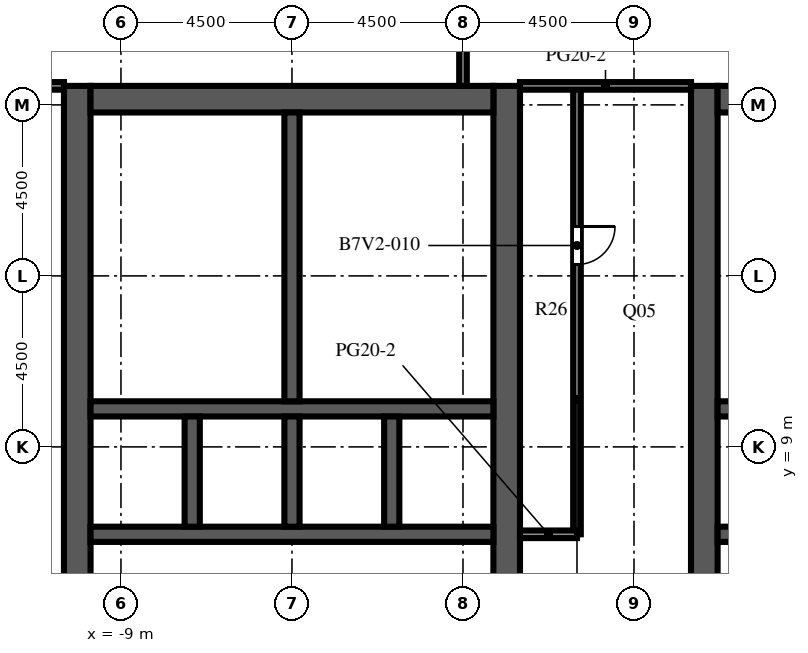
"""IFC4 building model, lengths in metres.
Left out: names, types, materials, properties, quantities, classifications, styles, units other than length and angle.
Written with IfcOpenShell. Run it as: python <this file> out.ifc"""

import sys

from ifc_helpers import new_model, si_unit, direction, frame, frame_2d, origin, place, context, subcontext, project, spatial, rectangle, extrude, element, fill, save


model = new_model("IFC4")
c1 = context("Model", 3, precision=1e-05, world=origin(), true_north=direction((0.0, 1.0)))
c2 = subcontext(c1, "Body", "Model", "MODEL_VIEW")
j1 = project(units=[si_unit("LENGTHUNIT", "METRE"), si_unit("PLANEANGLEUNIT", "RADIAN")], contexts=[c1])
p1 = place(None, origin())
s1 = spatial("IfcSite", under=j1, at=p1, CompositionType="ELEMENT")
p2 = place(p1, origin())
s2 = spatial("IfcBuilding", under=s1, at=p2, CompositionType="ELEMENT")
p3 = place(p2, frame((0.0, 0.0, 256.2)))
s3 = spatial("IfcBuildingStorey", under=s2, at=p3, CompositionType="ELEMENT", Elevation=256.2)
p4 = place(p3, frame((-10.15, -9.0, 0.0), z_axis=(0.0, 0.0, 1.0), x_axis=(0.0, 1.0, 0.0)))
e1 = element("IfcWall", 1, at=p4, inside=s3, PredefinedType="SHEAR", context=c2, shape_type="SweptSolid", body=[
    extrude(rectangle(XDim=27.5, YDim=0.7, at=frame_2d((13.75, 0.0))), origin(), (0.0, 0.0, 1.0), 4.1),
])
p5 = place(p4, frame((12.55, 0.0, 0.0)))
e2 = element("IfcOpeningElement", 2, at=p5, cuts=e1, PredefinedType="OPENING", context=c2, shape_type="SweptSolid", body=[
    extrude(rectangle(XDim=2.4, YDim=2.4, at=frame_2d((1.2, 1.2))), frame((0.0, 0.36, 0.0), z_axis=(0.0, -1.0, 0.0), x_axis=(1.0, 0.0, 0.0)), (0.0, 0.0, 1.0), 0.72),
])
p6 = place(p4, frame((6.825, 0.0, 0.0)))
e3 = element("IfcOpeningElement", 3, at=p6, cuts=e1, PredefinedType="OPENING", context=c2, shape_type="SweptSolid", body=[
    extrude(rectangle(XDim=1.2, YDim=2.1, at=frame_2d((0.6, 1.05))), frame((0.0, 0.36, 0.0), z_axis=(0.0, -1.0, 0.0), x_axis=(1.0, 0.0, 0.0)), (0.0, 0.0, 1.0), 0.72),
])
p7 = place(p4, frame((19.475, 0.0, 0.0)))
e4 = element("IfcOpeningElement", 4, at=p7, cuts=e1, PredefinedType="OPENING", context=c2, shape_type="SweptSolid", body=[
    extrude(rectangle(XDim=1.2, YDim=2.1, at=frame_2d((0.6, 1.05))), frame((0.0, 0.36, 0.0), z_axis=(0.0, -1.0, 0.0), x_axis=(1.0, 0.0, 0.0)), (0.0, 0.0, 1.0), 0.72),
])
p8 = place(p3, frame((1.15, -9.0, 0.0), z_axis=(0.0, 0.0, 1.0), x_axis=(0.0, 1.0, 0.0)))
e5 = element("IfcWall", 5, at=p8, inside=s3, PredefinedType="SHEAR", context=c2, shape_type="SweptSolid", body=[
    extrude(rectangle(XDim=27.5, YDim=0.7, at=frame_2d((13.75, 0.0))), origin(), (0.0, 0.0, 1.0), 4.1),
])
p9 = place(p8, frame((12.55, 0.0, 0.0)))
e6 = element("IfcOpeningElement", 6, at=p9, cuts=e5, PredefinedType="OPENING", context=c2, shape_type="SweptSolid", body=[
    extrude(rectangle(XDim=2.4, YDim=2.4, at=frame_2d((1.2, 1.2))), frame((0.0, 0.36, 0.0), z_axis=(0.0, -1.0, 0.0), x_axis=(1.0, 0.0, 0.0)), (0.0, 0.0, 1.0), 0.72),
])
p10 = place(p8, frame((3.788, 0.0, 0.0)))
e7 = element("IfcOpeningElement", 7, at=p10, cuts=e5, PredefinedType="OPENING", context=c2, shape_type="SweptSolid", body=[
    extrude(rectangle(XDim=0.968, YDim=2.1, at=frame_2d((0.484, 1.05))), frame((0.0, 0.36, 0.0), z_axis=(0.0, -1.0, 0.0), x_axis=(1.0, 0.0, 0.0)), (0.0, 0.0, 1.0), 0.72),
])
p11 = place(p8, frame((23.54, 0.0, 0.0)))
e8 = element("IfcOpeningElement", 8, at=p11, cuts=e5, PredefinedType="OPENING", context=c2, shape_type="SweptSolid", body=[
    extrude(rectangle(XDim=1.2, YDim=2.1, at=frame_2d((0.6, 1.05))), frame((0.0, 0.36, 0.0), z_axis=(0.0, -1.0, 0.0), x_axis=(1.0, 0.0, 0.0)), (0.0, 0.0, 1.0), 0.72),
])
p12 = place(p3, frame((-9.8, 18.15, 0.0), z_axis=(0.0, 0.0, 1.0), x_axis=(1.0, 0.0, 0.0)))
e9 = element("IfcWall", 9, at=p12, inside=s3, PredefinedType="SHEAR", context=c2, shape_type="SweptSolid", body=[
    extrude(rectangle(XDim=10.6, YDim=0.7, at=frame_2d((5.3, 0.0))), origin(), (0.0, 0.0, 1.0), 4.1),
])
p13 = place(p3, frame((-9.8, 6.7, 0.0), z_axis=(0.0, 0.0, 1.0), x_axis=(1.0, 0.0, 0.0)))
e10 = element("IfcWall", 10, at=p13, inside=s3, PredefinedType="SHEAR", context=c2, shape_type="SweptSolid", body=[
    extrude(rectangle(XDim=10.6, YDim=0.4, at=frame_2d((5.3, 0.0))), origin(), (0.0, 0.0, 1.0), 4.1),
])
p14 = place(p13, frame((3.438, 0.0, 0.0)))
e11 = element("IfcOpeningElement", 11, at=p14, cuts=e10, PredefinedType="OPENING", context=c2, shape_type="SweptSolid", body=[
    extrude(rectangle(XDim=1.1, YDim=2.1, at=frame_2d((0.55, 1.05))), frame((0.0, 0.21, 0.0), z_axis=(0.0, -1.0, 0.0), x_axis=(1.0, 0.0, 0.0)), (0.0, 0.0, 1.0), 0.42),
])
p15 = place(p13, frame((6.062, 0.0, 0.0)))
e12 = element("IfcOpeningElement", 12, at=p15, cuts=e10, PredefinedType="OPENING", context=c2, shape_type="SweptSolid", body=[
    extrude(rectangle(XDim=1.1, YDim=2.1, at=frame_2d((0.55, 1.05))), frame((0.0, 0.21, 0.0), z_axis=(0.0, -1.0, 0.0), x_axis=(1.0, 0.0, 0.0)), (0.0, 0.0, 1.0), 0.42),
])
p16 = place(p13, frame((8.812, 0.0, 0.0)))
e13 = element("IfcOpeningElement", 13, at=p16, cuts=e10, PredefinedType="OPENING", context=c2, shape_type="SweptSolid", body=[
    extrude(rectangle(XDim=1.1, YDim=2.1, at=frame_2d((0.55, 1.05))), frame((0.0, 0.21, 0.0), z_axis=(0.0, -1.0, 0.0), x_axis=(1.0, 0.0, 0.0)), (0.0, 0.0, 1.0), 0.42),
])
p17 = place(p13, frame((0.738, 0.0, 0.0)))
e14 = element("IfcOpeningElement", 14, at=p17, cuts=e10, PredefinedType="OPENING", context=c2, shape_type="SweptSolid", body=[
    extrude(rectangle(XDim=1.0, YDim=2.1, at=frame_2d((0.5, 1.05))), frame((0.0, 0.21, 0.0), z_axis=(0.0, -1.0, 0.0), x_axis=(1.0, 0.0, 0.0)), (0.0, 0.0, 1.0), 0.42),
])
p18 = place(p3, frame((-9.8, 10.0, 0.0), z_axis=(0.0, 0.0, 1.0), x_axis=(1.0, 0.0, 0.0)))
e15 = element("IfcWall", 15, at=p18, inside=s3, PredefinedType="SHEAR", context=c2, shape_type="SweptSolid", body=[
    extrude(rectangle(XDim=10.6, YDim=0.4, at=frame_2d((5.3, 0.0))), origin(), (0.0, 0.0, 1.0), 4.1),
])
for number, where, z_axis, x_axis in (
    (16, (-7.125, 6.9, 0.0), (0.0, 0.0, 1.0), (0.0, 1.0, 0.0)),
    (17, (-4.5, 6.9, 0.0), (0.0, 0.0, 1.0), (0.0, 1.0, 0.0)),
    (18, (-1.875, 6.9, 0.0), (0.0, 0.0, 1.0), (0.0, 1.0, 0.0)),
):
    element("IfcWall", number, at=place(p3, frame(where, z_axis=z_axis, x_axis=x_axis)), inside=s3, PredefinedType="SHEAR", context=c2, shape_type="SweptSolid", body=[
        extrude(rectangle(XDim=2.9, YDim=0.4, at=frame_2d((1.45, 0.0))), origin(), (0.0, 0.0, 1.0), 4.1),
    ])
p19 = place(p3, frame((-4.5, 10.2, 0.0), z_axis=(0.0, 0.0, 1.0), x_axis=(0.0, 1.0, 0.0)))
e19 = element("IfcWall", 19, at=p19, inside=s3, PredefinedType="SHEAR", context=c2, shape_type="SweptSolid", body=[
    extrude(rectangle(XDim=7.6, YDim=0.4, at=frame_2d((3.8, 0.0))), origin(), (0.0, 0.0, 1.0), 4.1),
])
p20 = place(p3, frame((6.35, -9.0, 0.0), z_axis=(0.0, 0.0, 1.0), x_axis=(0.0, 1.0, 0.0)))
e20 = element("IfcWall", 20, at=p20, inside=s3, PredefinedType="SHEAR", context=c2, shape_type="SweptSolid", body=[
    extrude(rectangle(XDim=27.5, YDim=0.7, at=frame_2d((13.75, 0.0))), origin(), (0.0, 0.0, 1.0), 4.1),
])
p21 = place(p20, frame((12.55, 0.0, 0.0)))
e21 = element("IfcOpeningElement", 21, at=p21, cuts=e20, PredefinedType="OPENING", context=c2, shape_type="SweptSolid", body=[
    extrude(rectangle(XDim=2.4, YDim=2.4, at=frame_2d((1.2, 1.2))), frame((0.0, 0.36, 0.0), z_axis=(0.0, -1.0, 0.0), x_axis=(1.0, 0.0, 0.0)), (0.0, 0.0, 1.0), 0.72),
])
p22 = place(p20, frame((3.788, 0.0, 0.0)))
e22 = element("IfcOpeningElement", 22, at=p22, cuts=e20, PredefinedType="OPENING", context=c2, shape_type="SweptSolid", body=[
    extrude(rectangle(XDim=0.968, YDim=2.1, at=frame_2d((0.484, 1.05))), frame((0.0, 0.36, 0.0), z_axis=(0.0, -1.0, 0.0), x_axis=(1.0, 0.0, 0.0)), (0.0, 0.0, 1.0), 0.72),
])
p23 = place(p20, frame((23.54, 0.0, 0.0)))
e23 = element("IfcOpeningElement", 23, at=p23, cuts=e20, PredefinedType="OPENING", context=c2, shape_type="SweptSolid", body=[
    extrude(rectangle(XDim=1.2, YDim=2.1, at=frame_2d((0.6, 1.05))), frame((0.0, 0.36, 0.0), z_axis=(0.0, -1.0, 0.0), x_axis=(1.0, 0.0, 0.0)), (0.0, 0.0, 1.0), 0.72),
])
p24 = place(p3, frame((6.7, 18.15, 0.0), z_axis=(0.0, 0.0, 1.0), x_axis=(1.0, 0.0, 0.0)))
e24 = element("IfcWall", 24, at=p24, inside=s3, PredefinedType="SHEAR", context=c2, shape_type="SweptSolid", body=[
    extrude(rectangle(XDim=10.6, YDim=0.7, at=frame_2d((5.3, 0.0))), origin(), (0.0, 0.0, 1.0), 4.1),
])
p25 = place(p3, frame((6.7, 6.7, 0.0), z_axis=(0.0, 0.0, 1.0), x_axis=(1.0, 0.0, 0.0)))
e25 = element("IfcWall", 25, at=p25, inside=s3, PredefinedType="SHEAR", context=c2, shape_type="SweptSolid", body=[
    extrude(rectangle(XDim=10.6, YDim=0.4, at=frame_2d((5.3, 0.0))), origin(), (0.0, 0.0, 1.0), 4.1),
])
p26 = place(p25, frame((3.438, 0.0, 0.0)))
e26 = element("IfcOpeningElement", 26, at=p26, cuts=e25, PredefinedType="OPENING", context=c2, shape_type="SweptSolid", body=[
    extrude(rectangle(XDim=1.1, YDim=2.1, at=frame_2d((0.55, 1.05))), frame((0.0, 0.21, 0.0), z_axis=(0.0, -1.0, 0.0), x_axis=(1.0, 0.0, 0.0)), (0.0, 0.0, 1.0), 0.42),
])
p27 = place(p25, frame((6.062, 0.0, 0.0)))
e27 = element("IfcOpeningElement", 27, at=p27, cuts=e25, PredefinedType="OPENING", context=c2, shape_type="SweptSolid", body=[
    extrude(rectangle(XDim=1.1, YDim=2.1, at=frame_2d((0.55, 1.05))), frame((0.0, 0.21, 0.0), z_axis=(0.0, -1.0, 0.0), x_axis=(1.0, 0.0, 0.0)), (0.0, 0.0, 1.0), 0.42),
])
p28 = place(p25, frame((8.812, 0.0, 0.0)))
e28 = element("IfcOpeningElement", 28, at=p28, cuts=e25, PredefinedType="OPENING", context=c2, shape_type="SweptSolid", body=[
    extrude(rectangle(XDim=1.1, YDim=2.1, at=frame_2d((0.55, 1.05))), frame((0.0, 0.21, 0.0), z_axis=(0.0, -1.0, 0.0), x_axis=(1.0, 0.0, 0.0)), (0.0, 0.0, 1.0), 0.42),
])
p29 = place(p25, frame((0.738, 0.0, 0.0)))
e29 = element("IfcOpeningElement", 29, at=p29, cuts=e25, PredefinedType="OPENING", context=c2, shape_type="SweptSolid", body=[
    extrude(rectangle(XDim=1.0, YDim=2.1, at=frame_2d((0.5, 1.05))), frame((0.0, 0.21, 0.0), z_axis=(0.0, -1.0, 0.0), x_axis=(1.0, 0.0, 0.0)), (0.0, 0.0, 1.0), 0.42),
])
p30 = place(p3, frame((6.7, 10.0, 0.0), z_axis=(0.0, 0.0, 1.0), x_axis=(1.0, 0.0, 0.0)))
e30 = element("IfcWall", 30, at=p30, inside=s3, PredefinedType="SHEAR", context=c2, shape_type="SweptSolid", body=[
    extrude(rectangle(XDim=10.6, YDim=0.4, at=frame_2d((5.3, 0.0))), origin(), (0.0, 0.0, 1.0), 4.1),
])
p31 = place(p3, frame((-0.5, 12.48, 0.0), z_axis=(0.0, 0.0, 1.0), x_axis=(1.0, 0.0, 0.0)))
e31 = element("IfcWall", 31, at=p31, inside=s3, PredefinedType="PARTITIONING", context=c2, shape_type="SweptSolid", body=[
    extrude(rectangle(XDim=1.3, YDim=0.1, at=frame_2d((0.65, 0.0))), origin(), (0.0, 0.0, 1.0), 3.5),
])
p32 = place(p31, frame((0.2, 0.0, 0.0)))
e32 = element("IfcOpeningElement", 32, at=p32, cuts=e31, PredefinedType="OPENING", context=c2, shape_type="SweptSolid", body=[
    extrude(rectangle(XDim=0.9, YDim=2.1, at=frame_2d((0.45, 1.05))), frame((0.0, 0.06, 0.0), z_axis=(0.0, -1.0, 0.0), x_axis=(1.0, 0.0, 0.0)), (0.0, 0.0, 1.0), 0.12),
])
p33 = place(p3, frame((-4.3, 12.48, 0.0), z_axis=(0.0, 0.0, 1.0), x_axis=(1.0, 0.0, 0.0)))
e33 = element("IfcWall", 33, at=p33, inside=s3, PredefinedType="PARTITIONING", context=c2, shape_type="SweptSolid", body=[
    extrude(rectangle(XDim=3.8, YDim=0.1, at=frame_2d((1.9, 0.0))), origin(), (0.0, 0.0, 1.0), 3.5),
])
p34 = place(p3, frame((-0.5, 12.48, 0.0), z_axis=(0.0, 0.0, 1.0), x_axis=(0.0, 1.0, 0.0)))
e34 = element("IfcWall", 34, at=p34, inside=s3, PredefinedType="PARTITIONING", context=c2, shape_type="SweptSolid", body=[
    extrude(rectangle(XDim=2.66, YDim=0.1, at=frame_2d((1.33, 0.0))), origin(), (0.0, 0.0, 1.0), 3.5),
])
p35 = place(p34, frame((0.83, 0.0, 0.0)))
e35 = element("IfcOpeningElement", 35, at=p35, cuts=e34, PredefinedType="OPENING", context=c2, shape_type="SweptSolid", body=[
    extrude(rectangle(XDim=1.0, YDim=2.1, at=frame_2d((0.5, 1.05))), frame((0.0, 0.06, 0.0), z_axis=(0.0, -1.0, 0.0), x_axis=(1.0, 0.0, 0.0)), (0.0, 0.0, 1.0), 0.12),
])
p36 = place(p3, frame((-0.5, 15.14, 0.0), z_axis=(0.0, 0.0, 1.0), x_axis=(0.0, 1.0, 0.0)))
e36 = element("IfcWall", 36, at=p36, inside=s3, PredefinedType="PARTITIONING", context=c2, shape_type="SweptSolid", body=[
    extrude(rectangle(XDim=2.66, YDim=0.1, at=frame_2d((1.33, 0.0))), origin(), (0.0, 0.0, 1.0), 3.5),
])
p37 = place(p36, frame((0.83, 0.0, 0.0)))
e37 = element("IfcOpeningElement", 37, at=p37, cuts=e36, PredefinedType="OPENING", context=c2, shape_type="SweptSolid", body=[
    extrude(rectangle(XDim=1.0, YDim=2.1, at=frame_2d((0.5, 1.05))), frame((0.0, 0.06, 0.0), z_axis=(0.0, -1.0, 0.0), x_axis=(1.0, 0.0, 0.0)), (0.0, 0.0, 1.0), 0.12),
])
p38 = place(p3, frame((-4.3, 15.14, 0.0), z_axis=(0.0, 0.0, 1.0), x_axis=(1.0, 0.0, 0.0)))
e38 = element("IfcWall", 38, at=p38, inside=s3, PredefinedType="PARTITIONING", context=c2, shape_type="SweptSolid", body=[
    extrude(rectangle(XDim=3.8, YDim=0.1, at=frame_2d((1.9, 0.0))), origin(), (0.0, 0.0, 1.0), 3.5),
])
p39 = place(p3, frame((6.7, 12.48, 0.0), z_axis=(0.0, 0.0, 1.0), x_axis=(1.0, 0.0, 0.0)))
e39 = element("IfcWall", 39, at=p39, inside=s3, PredefinedType="PARTITIONING", context=c2, shape_type="SweptSolid", body=[
    extrude(rectangle(XDim=1.3, YDim=0.1, at=frame_2d((0.65, 0.0))), origin(), (0.0, 0.0, 1.0), 3.5),
])
p40 = place(p39, frame((0.2, 0.0, 0.0)))
e40 = element("IfcOpeningElement", 40, at=p40, cuts=e39, PredefinedType="OPENING", context=c2, shape_type="SweptSolid", body=[
    extrude(rectangle(XDim=0.9, YDim=2.1, at=frame_2d((0.45, 1.05))), frame((0.0, 0.06, 0.0), z_axis=(0.0, -1.0, 0.0), x_axis=(1.0, 0.0, 0.0)), (0.0, 0.0, 1.0), 0.12),
])
p41 = place(p3, frame((0.0, 18.5, 0.0), z_axis=(0.0, 0.0, 1.0), x_axis=(0.0, 1.0, 0.0)))
e41 = element("IfcWall", 41, at=p41, inside=s3, PredefinedType="PARTITIONING", context=c2, shape_type="SweptSolid", body=[
    extrude(rectangle(XDim=3.5, YDim=0.2, at=frame_2d((1.75, 0.0))), origin(), (0.0, 0.0, 1.0), 3.5),
])
p42 = place(p3, frame((3.0, 6.7, 0.0), z_axis=(0.0, 0.0, 1.0), x_axis=(0.0, 1.0, 0.0)))
e42 = element("IfcWall", 42, at=p42, inside=s3, PredefinedType="PARTITIONING", context=c2, shape_type="SweptSolid", body=[
    extrude(rectangle(XDim=11.8, YDim=0.2, at=frame_2d((5.9, 0.0))), origin(), (0.0, 0.0, 1.0), 3.5),
])
p43 = place(p42, frame((7.1, 0.0, 0.0)))
e43 = element("IfcOpeningElement", 43, at=p43, cuts=e42, PredefinedType="OPENING", context=c2, shape_type="SweptSolid", body=[
    extrude(rectangle(XDim=1.0, YDim=2.1, at=frame_2d((0.5, 1.05))), frame((0.0, 0.11, 0.0), z_axis=(0.0, -1.0, 0.0), x_axis=(1.0, 0.0, 0.0)), (0.0, 0.0, 1.0), 0.22),
])
p44 = place(p3, frame((1.5, 6.7, 0.0), z_axis=(0.0, 0.0, 1.0), x_axis=(1.0, 0.0, 0.0)))
e44 = element("IfcWall", 44, at=p44, inside=s3, PredefinedType="PARTITIONING", context=c2, shape_type="SweptSolid", body=[
    extrude(rectangle(XDim=1.5, YDim=0.2, at=frame_2d((0.75, 0.0))), origin(), (0.0, 0.0, 1.0), 3.5),
])
p45 = place(p3, frame((-13.5, 18.5, 0.0), z_axis=(0.0, 0.0, 1.0), x_axis=(1.0, 0.0, 0.0)))
e45 = element("IfcWall", 45, at=p45, inside=s3, PredefinedType="PARTITIONING", context=c2, shape_type="SweptSolid", body=[
    extrude(rectangle(XDim=3.0, YDim=0.2, at=frame_2d((1.5, 0.0))), origin(), (0.0, 0.0, 1.0), 3.5),
])
p46 = place(p45, frame((1.1, 0.0, 0.0)))
e46 = element("IfcOpeningElement", 46, at=p46, cuts=e45, PredefinedType="OPENING", context=c2, shape_type="SweptSolid", body=[
    extrude(rectangle(XDim=1.0, YDim=2.1, at=frame_2d((0.5, 1.05))), frame((0.0, 0.11, 0.0), z_axis=(0.0, -1.0, 0.0), x_axis=(1.0, 0.0, 0.0)), (0.0, 0.0, 1.0), 0.22),
])
p47 = place(p3, frame((1.5, 18.5, 0.0), z_axis=(0.0, 0.0, 1.0), x_axis=(1.0, 0.0, 0.0)))
e47 = element("IfcWall", 47, at=p47, inside=s3, PredefinedType="PARTITIONING", context=c2, shape_type="SweptSolid", body=[
    extrude(rectangle(XDim=4.5, YDim=0.2, at=frame_2d((2.25, 0.0))), origin(), (0.0, 0.0, 1.0), 3.5),
])
p48 = place(p14, origin())
e48 = element("IfcDoor", 48, at=p48, inside=s3, OperationType="DOUBLE_DOOR_SLIDING", PredefinedType="DOOR", context=c2, shape_type="SweptSolid", body=[
    extrude(rectangle(XDim=1.1, YDim=2.1, at=frame_2d((0.55, 1.05))), frame((0.0, 0.025, 0.0), z_axis=(0.0, -1.0, 0.0), x_axis=(1.0, 0.0, 0.0)), (0.0, 0.0, 1.0), 0.05),
])
fill(e11, e48)
p49 = place(p15, origin())
e49 = element("IfcDoor", 49, at=p49, inside=s3, OperationType="DOUBLE_DOOR_SLIDING", PredefinedType="DOOR", context=c2, shape_type="SweptSolid", body=[
    extrude(rectangle(XDim=1.1, YDim=2.1, at=frame_2d((0.55, 1.05))), frame((0.0, 0.025, 0.0), z_axis=(0.0, -1.0, 0.0), x_axis=(1.0, 0.0, 0.0)), (0.0, 0.0, 1.0), 0.05),
])
fill(e12, e49)
p50 = place(p16, origin())
e50 = element("IfcDoor", 50, at=p50, inside=s3, OperationType="DOUBLE_DOOR_SLIDING", PredefinedType="DOOR", context=c2, shape_type="SweptSolid", body=[
    extrude(rectangle(XDim=1.1, YDim=2.1, at=frame_2d((0.55, 1.05))), frame((0.0, 0.025, 0.0), z_axis=(0.0, -1.0, 0.0), x_axis=(1.0, 0.0, 0.0)), (0.0, 0.0, 1.0), 0.05),
])
fill(e13, e50)
p51 = place(p5, origin())
e51 = element("IfcDoor", 51, at=p51, inside=s3, OperationType="DOUBLE_DOOR_DOUBLE_SWING", PredefinedType="DOOR", context=c2, shape_type="SweptSolid", body=[
    extrude(rectangle(XDim=2.4, YDim=2.4, at=frame_2d((1.2, 1.2))), frame((0.0, 0.025, 0.0), z_axis=(0.0, -1.0, 0.0), x_axis=(1.0, 0.0, 0.0)), (0.0, 0.0, 1.0), 0.05),
])
fill(e2, e51)
p52 = place(p9, origin())
e52 = element("IfcDoor", 52, at=p52, inside=s3, OperationType="DOUBLE_DOOR_DOUBLE_SWING", PredefinedType="DOOR", context=c2, shape_type="SweptSolid", body=[
    extrude(rectangle(XDim=2.4, YDim=2.4, at=frame_2d((1.2, 1.2))), frame((0.0, 0.025, 0.0), z_axis=(0.0, -1.0, 0.0), x_axis=(1.0, 0.0, 0.0)), (0.0, 0.0, 1.0), 0.05),
])
fill(e6, e52)
p53 = place(p21, origin())
e53 = element("IfcDoor", 53, at=p53, inside=s3, OperationType="DOUBLE_DOOR_DOUBLE_SWING", PredefinedType="DOOR", context=c2, shape_type="SweptSolid", body=[
    extrude(rectangle(XDim=2.4, YDim=2.4, at=frame_2d((1.2, 1.2))), frame((0.0, 0.025, 0.0), z_axis=(0.0, -1.0, 0.0), x_axis=(1.0, 0.0, 0.0)), (0.0, 0.0, 1.0), 0.05),
])
fill(e21, e53)
p54 = place(p7, origin())
e54 = element("IfcDoor", 54, at=p54, inside=s3, OperationType="SINGLE_SWING_LEFT", PredefinedType="DOOR", context=c2, shape_type="SweptSolid", body=[
    extrude(rectangle(XDim=1.2, YDim=2.1, at=frame_2d((0.6, 1.05))), frame((0.0, 0.025, 0.0), z_axis=(0.0, -1.0, 0.0), x_axis=(1.0, 0.0, 0.0)), (0.0, 0.0, 1.0), 0.05),
])
fill(e4, e54)
p55 = place(p17, origin())
e55 = element("IfcDoor", 55, at=p55, inside=s3, OperationType="SINGLE_SWING_LEFT", PredefinedType="DOOR", context=c2, shape_type="SweptSolid", body=[
    extrude(rectangle(XDim=1.0, YDim=2.1, at=frame_2d((0.5, 1.05))), frame((0.0, 0.025, 0.0), z_axis=(0.0, -1.0, 0.0), x_axis=(1.0, 0.0, 0.0)), (0.0, 0.0, 1.0), 0.05),
])
fill(e14, e55)
p56 = place(p32, origin())
e56 = element("IfcDoor", 56, at=p56, inside=s3, OperationType="SINGLE_SWING_LEFT", PredefinedType="DOOR", context=c2, shape_type="SweptSolid", body=[
    extrude(rectangle(XDim=0.9, YDim=2.1, at=frame_2d((0.45, 1.05))), frame((0.0, 0.025, 0.0), z_axis=(0.0, -1.0, 0.0), x_axis=(1.0, 0.0, 0.0)), (0.0, 0.0, 1.0), 0.05),
])
fill(e32, e56)
p57 = place(p11, origin())
e57 = element("IfcDoor", 57, at=p57, inside=s3, OperationType="SINGLE_SWING_RIGHT", PredefinedType="DOOR", context=c2, shape_type="SweptSolid", body=[
    extrude(rectangle(XDim=1.2, YDim=2.1, at=frame_2d((0.6, 1.05))), frame((0.0, 0.325, 0.0), z_axis=(0.0, -1.0, 0.0), x_axis=(1.0, 0.0, 0.0)), (0.0, 0.0, 1.0), 0.05),
])
fill(e8, e57)
p58 = place(p35, origin())
e58 = element("IfcDoor", 58, at=p58, inside=s3, OperationType="SINGLE_SWING_LEFT", PredefinedType="DOOR", context=c2, shape_type="SweptSolid", body=[
    extrude(rectangle(XDim=1.0, YDim=2.1, at=frame_2d((0.5, 1.05))), frame((0.0, 0.025, 0.0), z_axis=(0.0, -1.0, 0.0), x_axis=(1.0, 0.0, 0.0)), (0.0, 0.0, 1.0), 0.05),
])
fill(e35, e58)
p59 = place(p37, origin())
e59 = element("IfcDoor", 59, at=p59, inside=s3, OperationType="SINGLE_SWING_RIGHT", PredefinedType="DOOR", context=c2, shape_type="SweptSolid", body=[
    extrude(rectangle(XDim=1.0, YDim=2.1, at=frame_2d((0.5, 1.05))), frame((0.0, 0.025, 0.0), z_axis=(0.0, -1.0, 0.0), x_axis=(1.0, 0.0, 0.0)), (0.0, 0.0, 1.0), 0.05),
])
fill(e37, e59)
p60 = place(p40, origin())
e60 = element("IfcDoor", 60, at=p60, inside=s3, OperationType="SINGLE_SWING_RIGHT", PredefinedType="DOOR", context=c2, shape_type="SweptSolid", body=[
    extrude(rectangle(XDim=0.9, YDim=2.1, at=frame_2d((0.45, 1.05))), frame((0.0, 0.025, 0.0), z_axis=(0.0, -1.0, 0.0), x_axis=(1.0, 0.0, 0.0)), (0.0, 0.0, 1.0), 0.05),
])
fill(e40, e60)
p61 = place(p23, origin())
e61 = element("IfcDoor", 61, at=p61, inside=s3, OperationType="SINGLE_SWING_LEFT", PredefinedType="DOOR", context=c2, shape_type="SweptSolid", body=[
    extrude(rectangle(XDim=1.2, YDim=2.1, at=frame_2d((0.6, 1.05))), frame((0.0, -0.275, 0.0), z_axis=(0.0, -1.0, 0.0), x_axis=(1.0, 0.0, 0.0)), (0.0, 0.0, 1.0), 0.05),
])
fill(e23, e61)
p62 = place(p43, origin())
e62 = element("IfcDoor", 62, at=p62, inside=s3, OperationType="SINGLE_SWING_RIGHT", PredefinedType="DOOR", context=c2, shape_type="SweptSolid", body=[
    extrude(rectangle(XDim=1.0, YDim=2.1, at=frame_2d((0.5, 1.05))), frame((0.0, 0.025, 0.0), z_axis=(0.0, -1.0, 0.0), x_axis=(1.0, 0.0, 0.0)), (0.0, 0.0, 1.0), 0.05),
])
fill(e43, e62)
save(model, sys.argv[1])
